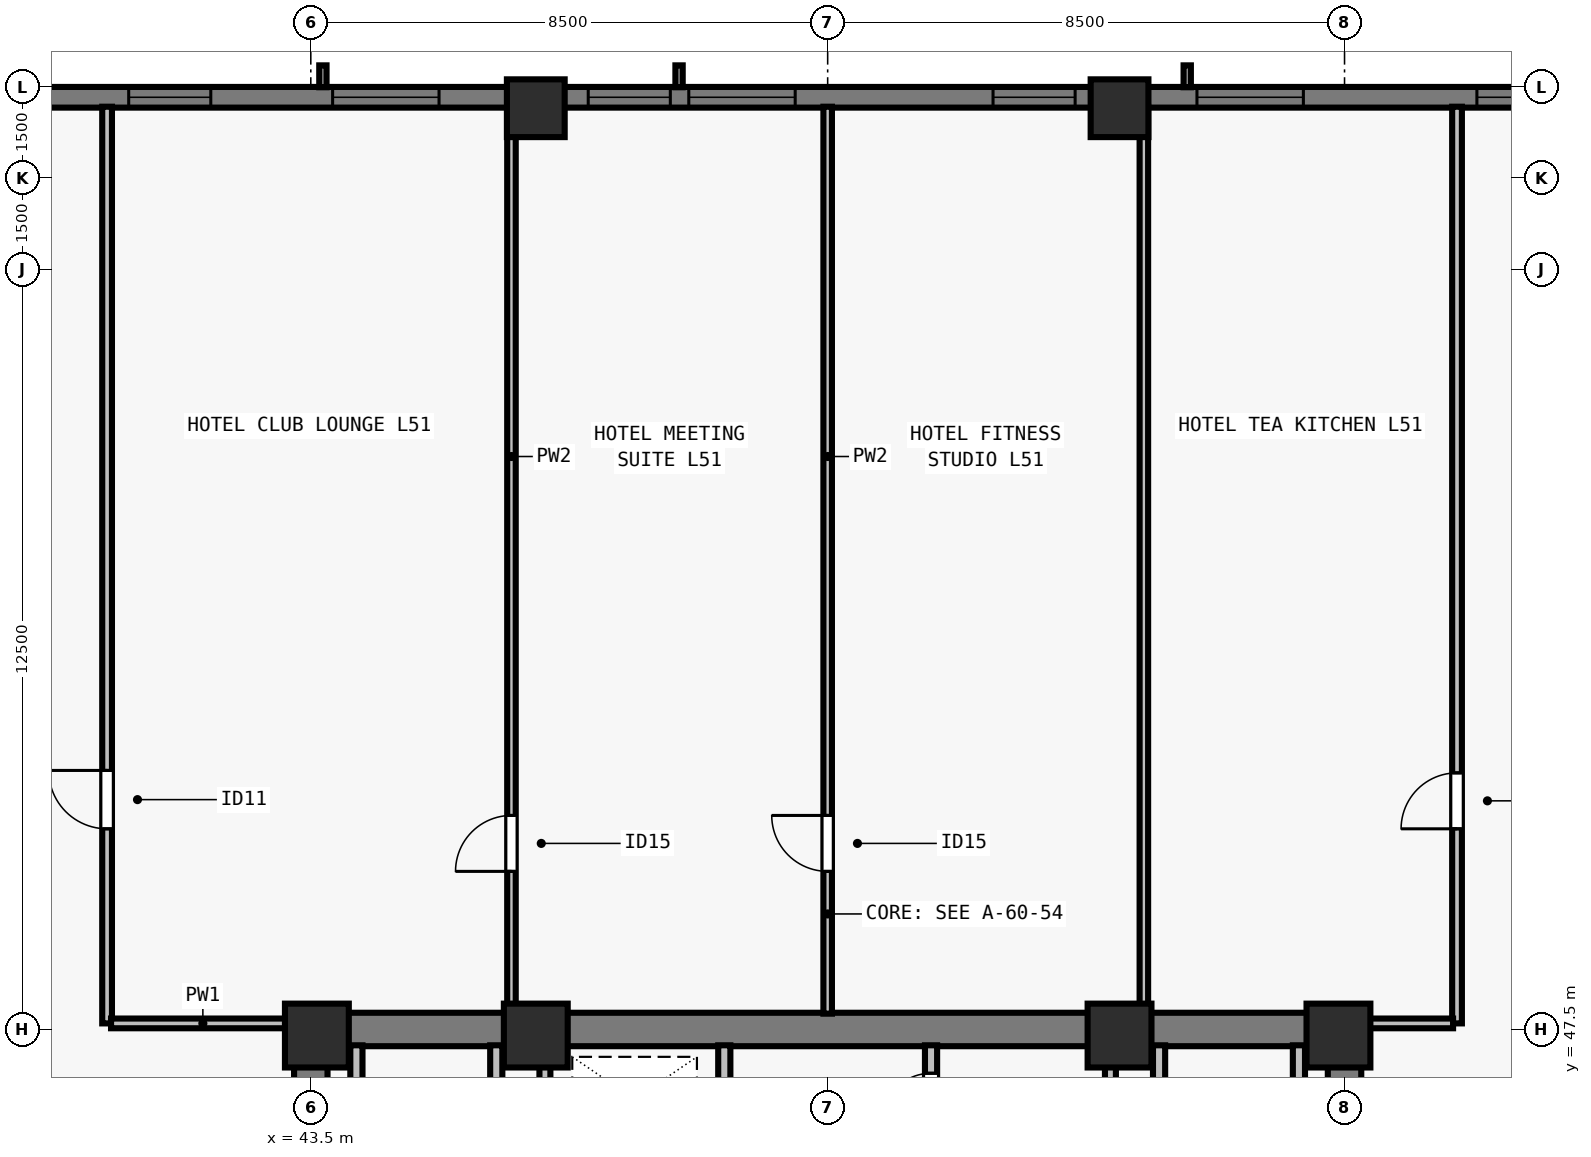
"""IFC4 building model, lengths in metres.
Left out: names, types, materials, properties, quantities, classifications, styles, units other than length and angle.
Written with IfcOpenShell. Run it as: python <this file> out.ifc"""

import sys

from ifc_helpers import new_model, si_unit, direction, frame, frame_2d, origin, origin_2d, place, context, subcontext, project, spatial, rectangle, extrude, element, fill, save


model = new_model("IFC4")
c1 = context("Model", 3, precision=1e-05, world=origin(), true_north=direction((0.0, 1.0)))
c2 = subcontext(c1, "Body", "Model", "MODEL_VIEW")
j1 = project(units=[si_unit("LENGTHUNIT", "METRE"), si_unit("PLANEANGLEUNIT", "RADIAN")], contexts=[c1])
p1 = place(None, origin())
s1 = spatial("IfcSite", under=j1, at=p1, CompositionType="ELEMENT")
p2 = place(p1, origin())
s2 = spatial("IfcBuilding", under=s1, at=p2, CompositionType="ELEMENT")
p3 = place(p2, frame((0.0, 0.0, 186.5)))
s3 = spatial("IfcBuildingStorey", under=s2, at=p3, CompositionType="ELEMENT", Elevation=186.5)
for number, where, z_axis, x_axis in (
    (1, (43.6, 47.4, 0.0), (0.0, 0.0, 1.0), (1.0, 0.0, 0.0)),
    (2, (47.2, 47.4, 0.0), (0.0, 0.0, 1.0), (1.0, 0.0, 0.0)),
    (3, (56.8, 47.4, 0.0), (0.0, 0.0, 1.0), (1.0, 0.0, 0.0)),
    (4, (60.4, 47.4, 0.0), (0.0, 0.0, 1.0), (1.0, 0.0, 0.0)),
):
    element("IfcColumn", number, at=place(p3, frame(where, z_axis=z_axis, x_axis=x_axis)), inside=s3, PredefinedType="COLUMN", context=c2, shape_type="SweptSolid", body=[
        extrude(rectangle(XDim=1.05, YDim=1.05, at=origin_2d()), origin(), (0.0, 0.0, 1.0), 3.5),
    ])
for number, where, z_axis, x_axis in (
    (5, (56.8, 62.65, 0.0), (0.0, 0.0, 1.0), (1.0, 0.0, 0.0)),
    (6, (47.2, 62.65, 0.0), (0.0, 0.0, 1.0), (1.0, 0.0, 0.0)),
):
    element("IfcColumn", number, at=place(p3, frame(where, z_axis=z_axis, x_axis=x_axis)), inside=s3, PredefinedType="COLUMN", context=c2, shape_type="SweptSolid", body=[
        extrude(rectangle(XDim=0.95, YDim=0.95, at=origin_2d()), origin(), (0.0, 0.0, 1.0), 3.5),
    ])
p4 = place(p3, frame((32.0, 62.83, 0.0), z_axis=(0.0, 0.0, 1.0), x_axis=(1.0, 0.0, 0.0)))
e7 = element("IfcWall", 7, at=p4, inside=s3, PredefinedType="SOLIDWALL", context=c2, shape_type="SweptSolid", body=[
    extrude(rectangle(XDim=39.682, YDim=0.34, at=frame_2d((19.841, 0.0))), origin(), (0.0, 0.0, 1.0), 3.28),
])
p5 = place(p4, frame((3.902, 0.0, 0.8)))
e8 = element("IfcOpeningElement", 8, at=p5, cuts=e7, PredefinedType="OPENING", context=c2, shape_type="SweptSolid", body=[
    extrude(rectangle(XDim=1.75, YDim=1.66, at=frame_2d((0.875, 0.83))), frame((0.0, 0.18, 0.0), z_axis=(0.0, -1.0, 0.0), x_axis=(1.0, 0.0, 0.0)), (0.0, 0.0, 1.0), 0.36),
])
p6 = place(p4, frame((8.505, 0.0, 0.8)))
e9 = element("IfcOpeningElement", 9, at=p6, cuts=e7, PredefinedType="OPENING", context=c2, shape_type="SweptSolid", body=[
    extrude(rectangle(XDim=1.35, YDim=1.66, at=frame_2d((0.675, 0.83))), frame((0.0, 0.18, 0.0), z_axis=(0.0, -1.0, 0.0), x_axis=(1.0, 0.0, 0.0)), (0.0, 0.0, 1.0), 0.36),
])
p7 = place(p4, frame((11.859, 0.0, 0.8)))
e10 = element("IfcOpeningElement", 10, at=p7, cuts=e7, PredefinedType="OPENING", context=c2, shape_type="SweptSolid", body=[
    extrude(rectangle(XDim=1.75, YDim=1.66, at=frame_2d((0.875, 0.83))), frame((0.0, 0.18, 0.0), z_axis=(0.0, -1.0, 0.0), x_axis=(1.0, 0.0, 0.0)), (0.0, 0.0, 1.0), 0.36),
])
p8 = place(p4, frame((16.062, 0.0, 0.8)))
e11 = element("IfcOpeningElement", 11, at=p8, cuts=e7, PredefinedType="OPENING", context=c2, shape_type="SweptSolid", body=[
    extrude(rectangle(XDim=1.35, YDim=1.66, at=frame_2d((0.675, 0.83))), frame((0.0, 0.18, 0.0), z_axis=(0.0, -1.0, 0.0), x_axis=(1.0, 0.0, 0.0)), (0.0, 0.0, 1.0), 0.36),
])
p9 = place(p4, frame((17.716, 0.0, 0.8)))
e12 = element("IfcOpeningElement", 12, at=p9, cuts=e7, PredefinedType="OPENING", context=c2, shape_type="SweptSolid", body=[
    extrude(rectangle(XDim=1.75, YDim=1.66, at=frame_2d((0.875, 0.83))), frame((0.0, 0.18, 0.0), z_axis=(0.0, -1.0, 0.0), x_axis=(1.0, 0.0, 0.0)), (0.0, 0.0, 1.0), 0.36),
])
p10 = place(p4, frame((22.719, 0.0, 0.8)))
e13 = element("IfcOpeningElement", 13, at=p10, cuts=e7, PredefinedType="OPENING", context=c2, shape_type="SweptSolid", body=[
    extrude(rectangle(XDim=1.35, YDim=1.66, at=frame_2d((0.675, 0.83))), frame((0.0, 0.18, 0.0), z_axis=(0.0, -1.0, 0.0), x_axis=(1.0, 0.0, 0.0)), (0.0, 0.0, 1.0), 0.36),
])
p11 = place(p4, frame((26.073, 0.0, 0.8)))
e14 = element("IfcOpeningElement", 14, at=p11, cuts=e7, PredefinedType="OPENING", context=c2, shape_type="SweptSolid", body=[
    extrude(rectangle(XDim=1.75, YDim=1.66, at=frame_2d((0.875, 0.83))), frame((0.0, 0.18, 0.0), z_axis=(0.0, -1.0, 0.0), x_axis=(1.0, 0.0, 0.0)), (0.0, 0.0, 1.0), 0.36),
])
p12 = place(p4, frame((30.677, 0.0, 0.8)))
e15 = element("IfcOpeningElement", 15, at=p12, cuts=e7, PredefinedType="OPENING", context=c2, shape_type="SweptSolid", body=[
    extrude(rectangle(XDim=1.35, YDim=1.66, at=frame_2d((0.675, 0.83))), frame((0.0, 0.18, 0.0), z_axis=(0.0, -1.0, 0.0), x_axis=(1.0, 0.0, 0.0)), (0.0, 0.0, 1.0), 0.36),
])
p13 = place(p4, frame((33.18, 0.0, 0.8)))
e16 = element("IfcOpeningElement", 16, at=p13, cuts=e7, PredefinedType="OPENING", context=c2, shape_type="SweptSolid", body=[
    extrude(rectangle(XDim=1.75, YDim=1.66, at=frame_2d((0.875, 0.83))), frame((0.0, 0.18, 0.0), z_axis=(0.0, -1.0, 0.0), x_axis=(1.0, 0.0, 0.0)), (0.0, 0.0, 1.0), 0.36),
])
p14 = place(p3, frame((43.225, 47.5, 0.0), z_axis=(0.0, 0.0, 1.0), x_axis=(1.0, 0.0, 0.0)))
e17 = element("IfcWall", 17, at=p14, inside=s3, PredefinedType="SHEAR", context=c2, shape_type="SweptSolid", body=[
    extrude(rectangle(XDim=17.55, YDim=0.55, at=frame_2d((8.775, 0.0))), origin(), (0.0, 0.0, 1.0), 3.28),
])
for number, where, z_axis, x_axis in (
    (18, (43.5, 40.8, 0.0), (0.0, 0.0, 1.0), (0.0, 1.0, 0.0)),
    (19, (60.5, 40.8, 0.0), (0.0, 0.0, 1.0), (0.0, 1.0, 0.0)),
):
    element("IfcWall", number, at=place(p3, frame(where, z_axis=z_axis, x_axis=x_axis)), inside=s3, PredefinedType="SHEAR", context=c2, shape_type="SweptSolid", body=[
        extrude(rectangle(XDim=6.435, YDim=0.55, at=frame_2d((3.218, 0.0))), origin(), (0.0, 0.0, 1.0), 3.28),
    ])
p15 = place(p3, frame((50.3, 40.585, 0.0), z_axis=(0.0, 0.0, 1.0), x_axis=(0.0, 1.0, 0.0)))
e20 = element("IfcWall", 20, at=p15, inside=s3, PredefinedType="SOLIDWALL", context=c2, shape_type="SweptSolid", body=[
    extrude(rectangle(XDim=6.655, YDim=0.2, at=frame_2d((3.328, 0.0))), origin(), (0.0, 0.0, 1.0), 3.28),
])
p16 = place(p15, frame((5.065, 0.0, 0.0)))
e21 = element("IfcOpeningElement", 21, at=p16, cuts=e20, PredefinedType="OPENING", context=c2, shape_type="SweptSolid", body=[
    extrude(rectangle(XDim=0.8, YDim=2.08, at=frame_2d((0.4, 1.04))), frame((0.0, 0.11, 0.0), z_axis=(0.0, -1.0, 0.0), x_axis=(1.0, 0.0, 0.0)), (0.0, 0.0, 1.0), 0.22),
])
p17 = place(p3, frame((53.7, 40.585, 0.0), z_axis=(0.0, 0.0, 1.0), x_axis=(0.0, 1.0, 0.0)))
e22 = element("IfcWall", 22, at=p17, inside=s3, PredefinedType="SOLIDWALL", context=c2, shape_type="SweptSolid", body=[
    extrude(rectangle(XDim=6.655, YDim=0.2, at=frame_2d((3.328, 0.0))), origin(), (0.0, 0.0, 1.0), 3.28),
])
p18 = place(p17, frame((0.195, 0.0, 0.0)))
e23 = element("IfcOpeningElement", 23, at=p18, cuts=e22, PredefinedType="OPENING", context=c2, shape_type="SweptSolid", body=[
    extrude(rectangle(XDim=0.8, YDim=2.08, at=frame_2d((0.4, 1.04))), frame((0.0, 0.11, 0.0), z_axis=(0.0, -1.0, 0.0), x_axis=(1.0, 0.0, 0.0)), (0.0, 0.0, 1.0), 0.22),
])
p19 = place(p17, frame((3.735, 0.0, 0.0)))
e24 = element("IfcOpeningElement", 24, at=p19, cuts=e22, PredefinedType="OPENING", context=c2, shape_type="SweptSolid", body=[
    extrude(rectangle(XDim=0.9, YDim=2.12, at=frame_2d((0.45, 1.06))), frame((0.0, 0.11, 0.0), z_axis=(0.0, -1.0, 0.0), x_axis=(1.0, 0.0, 0.0)), (0.0, 0.0, 1.0), 0.22),
])
p20 = place(p17, frame((5.395, 0.0, 0.0)))
e25 = element("IfcOpeningElement", 25, at=p20, cuts=e22, PredefinedType="OPENING", context=c2, shape_type="SweptSolid", body=[
    extrude(rectangle(XDim=0.8, YDim=2.1, at=frame_2d((0.4, 1.05))), frame((0.0, 0.11, 0.0), z_axis=(0.0, -1.0, 0.0), x_axis=(1.0, 0.0, 0.0)), (0.0, 0.0, 1.0), 0.22),
])
for number, where, z_axis, x_axis in (
    (26, (46.55, 43.735, 0.0), (0.0, 0.0, 1.0), (0.0, 1.0, 0.0)),
    (27, (44.25, 43.735, 0.0), (0.0, 0.0, 1.0), (0.0, 1.0, 0.0)),
    (28, (57.45, 43.735, 0.0), (0.0, 0.0, 1.0), (0.0, 1.0, 0.0)),
    (29, (59.75, 43.735, 0.0), (0.0, 0.0, 1.0), (0.0, 1.0, 0.0)),
):
    element("IfcWall", number, at=place(p3, frame(where, z_axis=z_axis, x_axis=x_axis)), inside=s3, PredefinedType="SOLIDWALL", context=c2, shape_type="SweptSolid", body=[
        extrude(rectangle(XDim=3.505, YDim=0.2, at=frame_2d((1.752, 0.0))), origin(), (0.0, 0.0, 1.0), 3.28),
    ])
for number, where, z_axis, x_axis in (
    (30, (47.35, 43.735, 0.0), (0.0, 0.0, 1.0), (0.0, 1.0, 0.0)),
    (31, (56.65, 43.735, 0.0), (0.0, 0.0, 1.0), (0.0, 1.0, 0.0)),
):
    element("IfcWall", number, at=place(p3, frame(where, z_axis=z_axis, x_axis=x_axis)), inside=s3, PredefinedType="SOLIDWALL", context=c2, shape_type="SweptSolid", body=[
        extrude(rectangle(XDim=3.505, YDim=0.18, at=frame_2d((1.752, 0.0))), origin(), (0.0, 0.0, 1.0), 3.28),
    ])
p21 = place(p3, frame((40.15, 47.6, 0.0), z_axis=(0.0, 0.0, 1.0), x_axis=(0.0, 1.0, 0.0)))
e32 = element("IfcWall", 32, at=p21, inside=s3, PredefinedType="PARTITIONING", context=c2, shape_type="SweptSolid", body=[
    extrude(rectangle(XDim=15.075, YDim=0.16, at=frame_2d((7.538, 0.0))), origin(), (0.0, 0.0, 1.0), 2.555),
])
p22 = place(p21, frame((3.2, 0.0, 0.0)))
e33 = element("IfcOpeningElement", 33, at=p22, cuts=e32, PredefinedType="OPENING", context=c2, shape_type="SweptSolid", body=[
    extrude(rectangle(XDim=0.96, YDim=2.12, at=frame_2d((0.48, 1.06))), frame((0.0, 0.09, 0.0), z_axis=(0.0, -1.0, 0.0), x_axis=(1.0, 0.0, 0.0)), (0.0, 0.0, 1.0), 0.18),
])
p23 = place(p3, frame((40.215, 47.6, 0.0), z_axis=(0.0, 0.0, 1.0), x_axis=(1.0, 0.0, 0.0)))
e34 = element("IfcWall", 34, at=p23, inside=s3, PredefinedType="PARTITIONING", context=c2, shape_type="SweptSolid", body=[
    extrude(rectangle(XDim=3.02, YDim=0.16, at=frame_2d((1.51, 0.0))), origin(), (0.0, 0.0, 1.0), 3.28),
])
p24 = place(p3, frame((62.35, 47.6, 0.0), z_axis=(0.0, 0.0, 1.0), x_axis=(0.0, 1.0, 0.0)))
e35 = element("IfcWall", 35, at=p24, inside=s3, PredefinedType="PARTITIONING", context=c2, shape_type="SweptSolid", body=[
    extrude(rectangle(XDim=15.075, YDim=0.16, at=frame_2d((7.538, 0.0))), origin(), (0.0, 0.0, 1.0), 2.555),
])
p25 = place(p24, frame((3.2, 0.0, 0.0)))
e36 = element("IfcOpeningElement", 36, at=p25, cuts=e35, PredefinedType="OPENING", context=c2, shape_type="SweptSolid", body=[
    extrude(rectangle(XDim=0.92, YDim=2.12, at=frame_2d((0.46, 1.06))), frame((0.0, 0.09, 0.0), z_axis=(0.0, -1.0, 0.0), x_axis=(1.0, 0.0, 0.0)), (0.0, 0.0, 1.0), 0.18),
])
p26 = place(p3, frame((60.765, 47.6, 0.0), z_axis=(0.0, 0.0, 1.0), x_axis=(1.0, 0.0, 0.0)))
e37 = element("IfcWall", 37, at=p26, inside=s3, PredefinedType="PARTITIONING", context=c2, shape_type="SweptSolid", body=[
    extrude(rectangle(XDim=1.52, YDim=0.16, at=frame_2d((0.76, 0.0))), origin(), (0.0, 0.0, 1.0), 3.28),
])
p27 = place(p3, frame((46.8, 47.76, 0.0), z_axis=(0.0, 0.0, 1.0), x_axis=(0.0, 1.0, 0.0)))
e38 = element("IfcWall", 38, at=p27, inside=s3, PredefinedType="PARTITIONING", context=c2, shape_type="SweptSolid", body=[
    extrude(rectangle(XDim=14.915, YDim=0.14, at=frame_2d((7.458, 0.0))), origin(), (0.0, 0.0, 1.0), 3.28),
])
p28 = place(p27, frame((2.34, 0.0, 0.0)))
e39 = element("IfcOpeningElement", 39, at=p28, cuts=e38, PredefinedType="OPENING", context=c2, shape_type="SweptSolid", body=[
    extrude(rectangle(XDim=0.92, YDim=2.12, at=frame_2d((0.46, 1.06))), frame((0.0, 0.08, 0.0), z_axis=(0.0, -1.0, 0.0), x_axis=(1.0, 0.0, 0.0)), (0.0, 0.0, 1.0), 0.16),
])
p29 = place(p3, frame((52.0, 47.76, 0.0), z_axis=(0.0, 0.0, 1.0), x_axis=(0.0, 1.0, 0.0)))
e40 = element("IfcWall", 40, at=p29, inside=s3, PredefinedType="PARTITIONING", context=c2, shape_type="SweptSolid", body=[
    extrude(rectangle(XDim=14.915, YDim=0.14, at=frame_2d((7.458, 0.0))), origin(), (0.0, 0.0, 1.0), 2.896),
])
p30 = place(p29, frame((2.34, 0.0, 0.0)))
e41 = element("IfcOpeningElement", 41, at=p30, cuts=e40, PredefinedType="OPENING", context=c2, shape_type="SweptSolid", body=[
    extrude(rectangle(XDim=0.92, YDim=2.12, at=frame_2d((0.46, 1.06))), frame((0.0, 0.08, 0.0), z_axis=(0.0, -1.0, 0.0), x_axis=(1.0, 0.0, 0.0)), (0.0, 0.0, 1.0), 0.16),
])
p31 = place(p3, frame((57.2, 47.76, 0.0), z_axis=(0.0, 0.0, 1.0), x_axis=(0.0, 1.0, 0.0)))
e42 = element("IfcWall", 42, at=p31, inside=s3, PredefinedType="PARTITIONING", context=c2, shape_type="SweptSolid", body=[
    extrude(rectangle(XDim=14.915, YDim=0.14, at=frame_2d((7.458, 0.0))), origin(), (0.0, 0.0, 1.0), 3.28),
])
p32 = place(p6, origin())
e43 = element("IfcWindow", 43, at=p32, inside=s3, PartitioningType="SINGLE_PANEL", PredefinedType="WINDOW", context=c2, shape_type="SweptSolid", body=[
    extrude(rectangle(XDim=1.35, YDim=1.66, at=frame_2d((0.675, 0.83))), frame((0.0, -0.05, 0.0), z_axis=(0.0, -1.0, 0.0), x_axis=(1.0, 0.0, 0.0)), (0.0, 0.0, 1.0), 0.06),
])
fill(e9, e43)
p33 = place(p7, origin())
e44 = element("IfcWindow", 44, at=p33, inside=s3, PartitioningType="SINGLE_PANEL", PredefinedType="WINDOW", context=c2, shape_type="SweptSolid", body=[
    extrude(rectangle(XDim=1.75, YDim=1.66, at=frame_2d((0.875, 0.83))), frame((0.0, -0.05, 0.0), z_axis=(0.0, -1.0, 0.0), x_axis=(1.0, 0.0, 0.0)), (0.0, 0.0, 1.0), 0.06),
])
fill(e10, e44)
p34 = place(p8, origin())
e45 = element("IfcWindow", 45, at=p34, inside=s3, PartitioningType="SINGLE_PANEL", PredefinedType="WINDOW", context=c2, shape_type="SweptSolid", body=[
    extrude(rectangle(XDim=1.35, YDim=1.66, at=frame_2d((0.675, 0.83))), frame((0.0, -0.05, 0.0), z_axis=(0.0, -1.0, 0.0), x_axis=(1.0, 0.0, 0.0)), (0.0, 0.0, 1.0), 0.06),
])
fill(e11, e45)
p35 = place(p9, origin())
e46 = element("IfcWindow", 46, at=p35, inside=s3, PartitioningType="SINGLE_PANEL", PredefinedType="WINDOW", context=c2, shape_type="SweptSolid", body=[
    extrude(rectangle(XDim=1.75, YDim=1.66, at=frame_2d((0.875, 0.83))), frame((0.0, -0.05, 0.0), z_axis=(0.0, -1.0, 0.0), x_axis=(1.0, 0.0, 0.0)), (0.0, 0.0, 1.0), 0.06),
])
fill(e12, e46)
p36 = place(p10, origin())
e47 = element("IfcWindow", 47, at=p36, inside=s3, PartitioningType="SINGLE_PANEL", PredefinedType="WINDOW", context=c2, shape_type="SweptSolid", body=[
    extrude(rectangle(XDim=1.35, YDim=1.66, at=frame_2d((0.675, 0.83))), frame((0.0, -0.05, 0.0), z_axis=(0.0, -1.0, 0.0), x_axis=(1.0, 0.0, 0.0)), (0.0, 0.0, 1.0), 0.06),
])
fill(e13, e47)
p37 = place(p11, origin())
e48 = element("IfcWindow", 48, at=p37, inside=s3, PartitioningType="SINGLE_PANEL", PredefinedType="WINDOW", context=c2, shape_type="SweptSolid", body=[
    extrude(rectangle(XDim=1.75, YDim=1.66, at=frame_2d((0.875, 0.83))), frame((0.0, -0.05, 0.0), z_axis=(0.0, -1.0, 0.0), x_axis=(1.0, 0.0, 0.0)), (0.0, 0.0, 1.0), 0.06),
])
fill(e14, e48)
p38 = place(p12, origin())
e49 = element("IfcWindow", 49, at=p38, inside=s3, PartitioningType="SINGLE_PANEL", PredefinedType="WINDOW", context=c2, shape_type="SweptSolid", body=[
    extrude(rectangle(XDim=1.35, YDim=1.66, at=frame_2d((0.675, 0.83))), frame((0.0, -0.05, 0.0), z_axis=(0.0, -1.0, 0.0), x_axis=(1.0, 0.0, 0.0)), (0.0, 0.0, 1.0), 0.06),
])
fill(e15, e49)
p39 = place(p20, origin())
e50 = element("IfcDoor", 50, at=p39, inside=s3, OperationType="SINGLE_SWING_LEFT", PredefinedType="DOOR", context=c2, shape_type="SweptSolid", body=[
    extrude(rectangle(XDim=0.8, YDim=2.1, at=frame_2d((0.4, 1.05))), frame((0.0, 0.025, 0.0), z_axis=(0.0, -1.0, 0.0), x_axis=(1.0, 0.0, 0.0)), (0.0, 0.0, 1.0), 0.05),
])
fill(e25, e50)
p40 = place(p22, origin())
e51 = element("IfcDoor", 51, at=p40, inside=s3, OperationType="SINGLE_SWING_RIGHT", PredefinedType="DOOR", context=c2, shape_type="SweptSolid", body=[
    extrude(rectangle(XDim=0.96, YDim=2.12, at=frame_2d((0.48, 1.06))), frame((0.0, 0.025, 0.0), z_axis=(0.0, -1.0, 0.0), x_axis=(1.0, 0.0, 0.0)), (0.0, 0.0, 1.0), 0.05),
])
fill(e33, e51)
p41 = place(p28, origin())
e52 = element("IfcDoor", 52, at=p41, inside=s3, OperationType="SINGLE_SWING_LEFT", PredefinedType="DOOR", context=c2, shape_type="SweptSolid", body=[
    extrude(rectangle(XDim=0.92, YDim=2.12, at=frame_2d((0.46, 1.06))), frame((0.0, 0.025, 0.0), z_axis=(0.0, -1.0, 0.0), x_axis=(1.0, 0.0, 0.0)), (0.0, 0.0, 1.0), 0.05),
])
fill(e39, e52)
p42 = place(p30, origin())
e53 = element("IfcDoor", 53, at=p42, inside=s3, OperationType="SINGLE_SWING_RIGHT", PredefinedType="DOOR", context=c2, shape_type="SweptSolid", body=[
    extrude(rectangle(XDim=0.92, YDim=2.12, at=frame_2d((0.46, 1.06))), frame((0.0, 0.025, 0.0), z_axis=(0.0, -1.0, 0.0), x_axis=(1.0, 0.0, 0.0)), (0.0, 0.0, 1.0), 0.05),
])
fill(e41, e53)
p43 = place(p25, origin())
e54 = element("IfcDoor", 54, at=p43, inside=s3, OperationType="SINGLE_SWING_LEFT", PredefinedType="DOOR", context=c2, shape_type="SweptSolid", body=[
    extrude(rectangle(XDim=0.92, YDim=2.12, at=frame_2d((0.46, 1.06))), frame((0.0, 0.025, 0.0), z_axis=(0.0, -1.0, 0.0), x_axis=(1.0, 0.0, 0.0)), (0.0, 0.0, 1.0), 0.05),
])
fill(e36, e54)
save(model, sys.argv[1])
